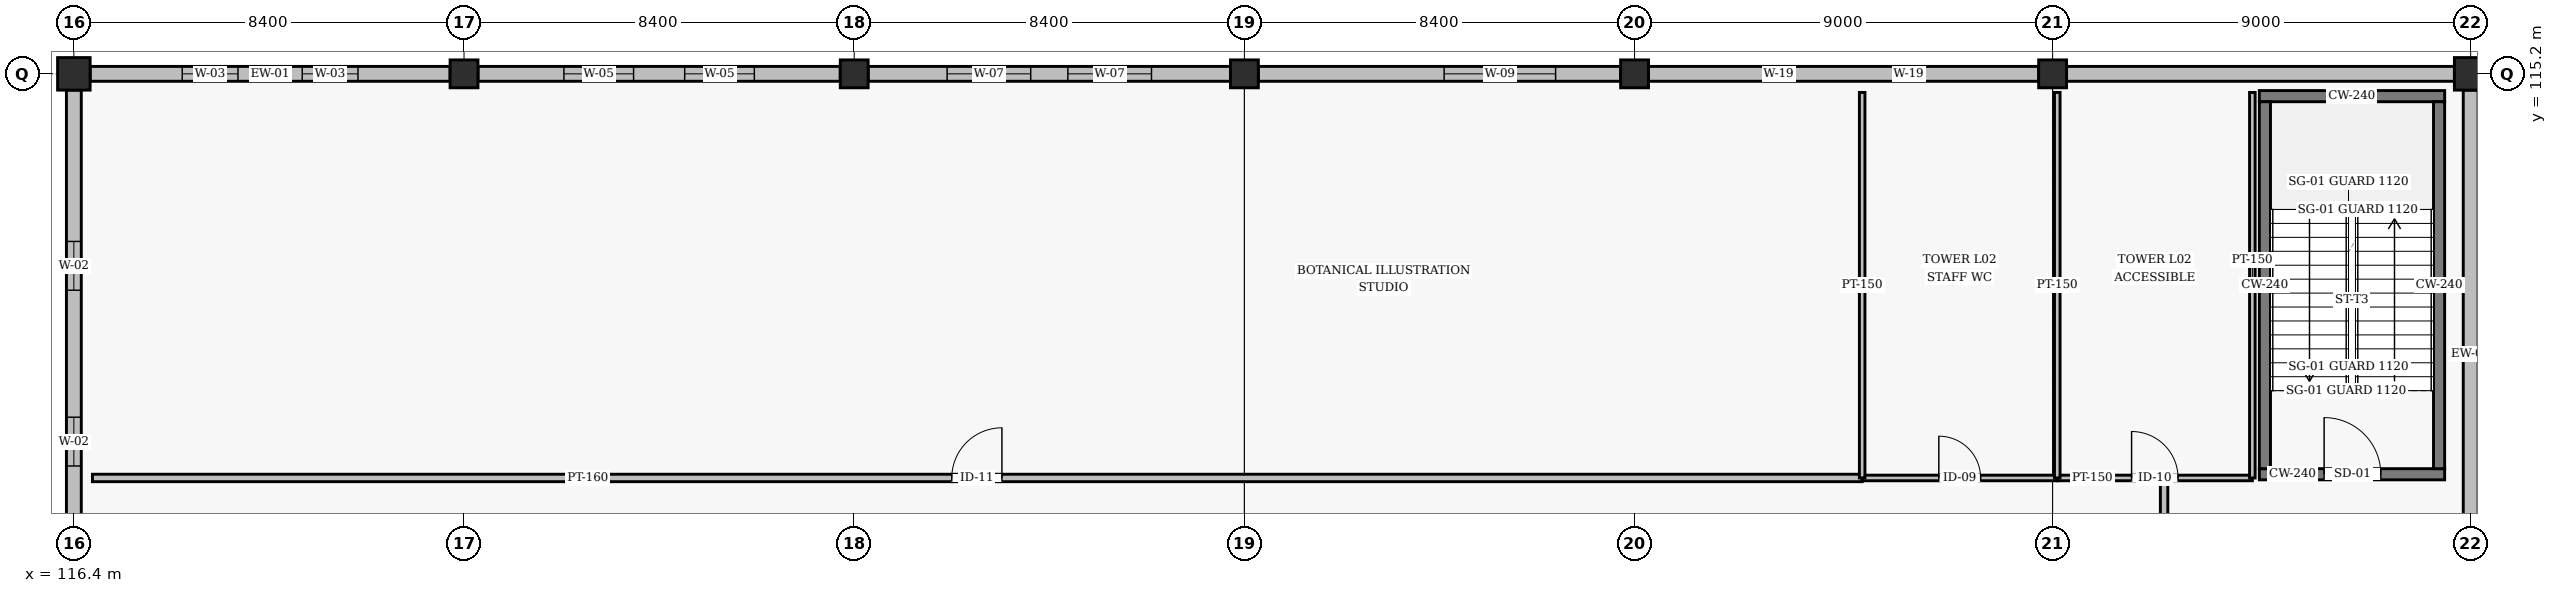
"""IFC4 building model, lengths in metres.
Left out: names, types, materials, properties, quantities, classifications, styles, units other than length and angle.
Written with IfcOpenShell. Run it as: python <this file> out.ifc"""

import sys

from ifc_helpers import new_model, si_unit, direction, frame, frame_2d, origin, origin_2d, place, context, subcontext, project, spatial, rectangle, hollow_rectangle, extrude, element, fill, save


model = new_model("IFC4")
c1 = context("Model", 3, precision=1e-05, world=origin(), true_north=direction((0.0, 1.0)))
c2 = subcontext(c1, "Body", "Model", "MODEL_VIEW")
j1 = project(units=[si_unit("LENGTHUNIT", "METRE"), si_unit("PLANEANGLEUNIT", "RADIAN")], contexts=[c1])
p1 = place(None, origin())
s1 = spatial("IfcSite", under=j1, at=p1, CompositionType="ELEMENT")
p2 = place(p1, origin())
s2 = spatial("IfcBuilding", under=s1, at=p2, CompositionType="ELEMENT")
p3 = place(p2, frame((0.0, 0.0, 9.0)))
s3 = spatial("IfcBuildingStorey", under=s2, at=p3, CompositionType="ELEMENT", Elevation=9.0)
p4 = place(p3, frame((116.4, 115.2, 0.0), z_axis=(0.0, 0.0, 1.0), x_axis=(1.0, 0.0, 0.0)))
e1 = element("IfcColumn", 1, at=p4, inside=s3, PredefinedType="COLUMN", context=c2, shape_type="SweptSolid", body=[
    extrude(hollow_rectangle(XDim=0.7, YDim=0.7, WallThickness=0.032, InnerFilletRadius=0.032, OuterFilletRadius=0.064, at=origin_2d()), origin(), (0.0, 0.0, 1.0), 4.2),
])
for number, where, z_axis, x_axis in (
    (2, (124.8, 115.2, 0.0), (0.0, 0.0, 1.0), (1.0, 0.0, 0.0)),
    (3, (133.2, 115.2, 0.0), (0.0, 0.0, 1.0), (1.0, 0.0, 0.0)),
    (4, (141.6, 115.2, 0.0), (0.0, 0.0, 1.0), (1.0, 0.0, 0.0)),
    (5, (150.0, 115.2, 0.0), (0.0, 0.0, 1.0), (1.0, 0.0, 0.0)),
    (6, (159.0, 115.2, 0.0), (0.0, 0.0, 1.0), (1.0, 0.0, 0.0)),
):
    element("IfcColumn", number, at=place(p3, frame(where, z_axis=z_axis, x_axis=x_axis)), inside=s3, PredefinedType="COLUMN", context=c2, shape_type="SweptSolid", body=[
        extrude(hollow_rectangle(XDim=0.6, YDim=0.6, WallThickness=0.025, InnerFilletRadius=0.025, OuterFilletRadius=0.05, at=origin_2d()), origin(), (0.0, 0.0, 1.0), 4.2),
    ])
p5 = place(p3, frame((168.0, 115.2, 0.0), z_axis=(0.0, 0.0, 1.0), x_axis=(1.0, 0.0, 0.0)))
e7 = element("IfcColumn", 7, at=p5, inside=s3, PredefinedType="COLUMN", context=c2, shape_type="SweptSolid", body=[
    extrude(hollow_rectangle(XDim=0.7, YDim=0.7, WallThickness=0.032, InnerFilletRadius=0.032, OuterFilletRadius=0.064, at=origin_2d()), origin(), (0.0, 0.0, 1.0), 4.2),
])
p6 = place(p3, frame((168.0, 103.5, 0.0), z_axis=(0.0, 0.0, 1.0), x_axis=(0.0, 1.0, 0.0)))
e8 = element("IfcWall", 8, at=p6, inside=s3, PredefinedType="SOLIDWALL", context=c2, shape_type="SweptSolid", body=[
    extrude(rectangle(XDim=11.35, YDim=0.32, at=frame_2d((5.675, 0.0))), origin(), (0.0, 0.0, 1.0), 3.143),
])
p7 = place(p3, frame((167.65, 115.2, 0.0), z_axis=(0.0, 0.0, 1.0), x_axis=(-1.0, 0.0, 0.0)))
e9 = element("IfcWall", 9, at=p7, inside=s3, PredefinedType="SOLIDWALL", context=c2, shape_type="SweptSolid", body=[
    extrude(rectangle(XDim=8.35, YDim=0.32, at=frame_2d((4.175, 0.0))), origin(), (0.0, 0.0, 1.0), 3.143),
])
p8 = place(p3, frame((158.7, 115.2, 0.0), z_axis=(0.0, 0.0, 1.0), x_axis=(-1.0, 0.0, 0.0)))
e10 = element("IfcWall", 10, at=p8, inside=s3, PredefinedType="SOLIDWALL", context=c2, shape_type="SweptSolid", body=[
    extrude(rectangle(XDim=8.4, YDim=0.32, at=frame_2d((4.2, 0.0))), origin(), (0.0, 0.0, 1.0), 3.143),
])
p9 = place(p8, frame((2.475, 0.0, 1.35)))
e11 = element("IfcOpeningElement", 11, at=p9, cuts=e10, PredefinedType="OPENING", context=c2, shape_type="SweptSolid", body=[
    extrude(rectangle(XDim=0.65, YDim=1.2, at=frame_2d((0.325, 0.6))), frame((0.0, 0.17, 0.0), z_axis=(0.0, -1.0, 0.0), x_axis=(1.0, 0.0, 0.0)), (0.0, 0.0, 1.0), 0.34),
])
p10 = place(p8, frame((5.275, 0.0, 1.35)))
e12 = element("IfcOpeningElement", 12, at=p10, cuts=e10, PredefinedType="OPENING", context=c2, shape_type="SweptSolid", body=[
    extrude(rectangle(XDim=0.65, YDim=1.2, at=frame_2d((0.325, 0.6))), frame((0.0, 0.17, 0.0), z_axis=(0.0, -1.0, 0.0), x_axis=(1.0, 0.0, 0.0)), (0.0, 0.0, 1.0), 0.34),
])
p11 = place(p3, frame((149.7, 115.2, 0.0), z_axis=(0.0, 0.0, 1.0), x_axis=(-1.0, 0.0, 0.0)))
e13 = element("IfcWall", 13, at=p11, inside=s3, PredefinedType="SOLIDWALL", context=c2, shape_type="SweptSolid", body=[
    extrude(rectangle(XDim=7.8, YDim=0.32, at=frame_2d((3.9, 0.0))), origin(), (0.0, 0.0, 1.0), 3.243),
])
p12 = place(p11, frame((1.4, 0.0, 0.85)))
e14 = element("IfcOpeningElement", 14, at=p12, cuts=e13, PredefinedType="OPENING", context=c2, shape_type="SweptSolid", body=[
    extrude(rectangle(XDim=2.4, YDim=2.1, at=frame_2d((1.2, 1.05))), frame((0.0, 0.17, 0.0), z_axis=(0.0, -1.0, 0.0), x_axis=(1.0, 0.0, 0.0)), (0.0, 0.0, 1.0), 0.34),
])
p13 = place(p3, frame((141.3, 115.2, 0.0), z_axis=(0.0, 0.0, 1.0), x_axis=(-1.0, 0.0, 0.0)))
e15 = element("IfcWall", 15, at=p13, inside=s3, PredefinedType="SOLIDWALL", context=c2, shape_type="SweptSolid", body=[
    extrude(rectangle(XDim=7.8, YDim=0.32, at=frame_2d((3.9, 0.0))), origin(), (0.0, 0.0, 1.0), 3.243),
])
p14 = place(p13, frame((1.7, 0.0, 0.85)))
e16 = element("IfcOpeningElement", 16, at=p14, cuts=e15, PredefinedType="OPENING", context=c2, shape_type="SweptSolid", body=[
    extrude(rectangle(XDim=1.8, YDim=2.1, at=frame_2d((0.9, 1.05))), frame((0.0, 0.17, 0.0), z_axis=(0.0, -1.0, 0.0), x_axis=(1.0, 0.0, 0.0)), (0.0, 0.0, 1.0), 0.34),
])
p15 = place(p13, frame((4.3, 0.0, 0.85)))
e17 = element("IfcOpeningElement", 17, at=p15, cuts=e15, PredefinedType="OPENING", context=c2, shape_type="SweptSolid", body=[
    extrude(rectangle(XDim=1.8, YDim=2.1, at=frame_2d((0.9, 1.05))), frame((0.0, 0.17, 0.0), z_axis=(0.0, -1.0, 0.0), x_axis=(1.0, 0.0, 0.0)), (0.0, 0.0, 1.0), 0.34),
])
p16 = place(p3, frame((132.9, 115.2, 0.0), z_axis=(0.0, 0.0, 1.0), x_axis=(-1.0, 0.0, 0.0)))
e18 = element("IfcWall", 18, at=p16, inside=s3, PredefinedType="SOLIDWALL", context=c2, shape_type="SweptSolid", body=[
    extrude(rectangle(XDim=7.8, YDim=0.32, at=frame_2d((3.9, 0.0))), origin(), (0.0, 0.0, 1.0), 3.243),
])
p17 = place(p16, frame((1.85, 0.0, 0.85)))
e19 = element("IfcOpeningElement", 19, at=p17, cuts=e18, PredefinedType="OPENING", context=c2, shape_type="SweptSolid", body=[
    extrude(rectangle(XDim=1.5, YDim=2.1, at=frame_2d((0.75, 1.05))), frame((0.0, 0.17, 0.0), z_axis=(0.0, -1.0, 0.0), x_axis=(1.0, 0.0, 0.0)), (0.0, 0.0, 1.0), 0.34),
])
p18 = place(p16, frame((4.45, 0.0, 0.85)))
e20 = element("IfcOpeningElement", 20, at=p18, cuts=e18, PredefinedType="OPENING", context=c2, shape_type="SweptSolid", body=[
    extrude(rectangle(XDim=1.5, YDim=2.1, at=frame_2d((0.75, 1.05))), frame((0.0, 0.17, 0.0), z_axis=(0.0, -1.0, 0.0), x_axis=(1.0, 0.0, 0.0)), (0.0, 0.0, 1.0), 0.34),
])
p19 = place(p3, frame((124.5, 115.2, 0.0), z_axis=(0.0, 0.0, 1.0), x_axis=(-1.0, 0.0, 0.0)))
e21 = element("IfcWall", 21, at=p19, inside=s3, PredefinedType="SOLIDWALL", context=c2, shape_type="SweptSolid", body=[
    extrude(rectangle(XDim=7.75, YDim=0.32, at=frame_2d((3.875, 0.0))), origin(), (0.0, 0.0, 1.0), 3.243),
])
p20 = place(p19, frame((1.983, 0.0, 0.85)))
e22 = element("IfcOpeningElement", 22, at=p20, cuts=e21, PredefinedType="OPENING", context=c2, shape_type="SweptSolid", body=[
    extrude(rectangle(XDim=1.2, YDim=2.1, at=frame_2d((0.6, 1.05))), frame((0.0, 0.17, 0.0), z_axis=(0.0, -1.0, 0.0), x_axis=(1.0, 0.0, 0.0)), (0.0, 0.0, 1.0), 0.34),
])
p21 = place(p19, frame((4.567, 0.0, 0.85)))
e23 = element("IfcOpeningElement", 23, at=p21, cuts=e21, PredefinedType="OPENING", context=c2, shape_type="SweptSolid", body=[
    extrude(rectangle(XDim=1.2, YDim=2.1, at=frame_2d((0.6, 1.05))), frame((0.0, 0.17, 0.0), z_axis=(0.0, -1.0, 0.0), x_axis=(1.0, 0.0, 0.0)), (0.0, 0.0, 1.0), 0.34),
])
p22 = place(p3, frame((116.4, 114.85, 0.0), z_axis=(0.0, 0.0, 1.0), x_axis=(0.0, -1.0, 0.0)))
e24 = element("IfcWall", 24, at=p22, inside=s3, PredefinedType="SOLIDWALL", context=c2, shape_type="SweptSolid", body=[
    extrude(rectangle(XDim=11.35, YDim=0.32, at=frame_2d((5.675, 0.0))), origin(), (0.0, 0.0, 1.0), 3.143),
])
p23 = place(p22, frame((3.258, 0.0, 0.9)))
e25 = element("IfcOpeningElement", 25, at=p23, cuts=e24, PredefinedType="OPENING", context=c2, shape_type="SweptSolid", body=[
    extrude(rectangle(XDim=1.05, YDim=1.95, at=frame_2d((0.525, 0.975))), frame((0.0, 0.17, 0.0), z_axis=(0.0, -1.0, 0.0), x_axis=(1.0, 0.0, 0.0)), (0.0, 0.0, 1.0), 0.34),
])
p24 = place(p22, frame((7.042, 0.0, 0.9)))
e26 = element("IfcOpeningElement", 26, at=p24, cuts=e24, PredefinedType="OPENING", context=c2, shape_type="SweptSolid", body=[
    extrude(rectangle(XDim=1.05, YDim=1.95, at=frame_2d((0.525, 0.975))), frame((0.0, 0.17, 0.0), z_axis=(0.0, -1.0, 0.0), x_axis=(1.0, 0.0, 0.0)), (0.0, 0.0, 1.0), 0.34),
])
p25 = place(p3, frame((163.45, 106.58, 0.0), z_axis=(0.0, 0.0, 1.0), x_axis=(1.0, 0.0, 0.0)))
e27 = element("IfcWall", 27, at=p25, inside=s3, PredefinedType="SHEAR", context=c2, shape_type="SweptSolid", body=[
    extrude(rectangle(XDim=3.99, YDim=0.24, at=frame_2d((1.995, 0.0))), origin(), (0.0, 0.0, 1.0), 3.935),
])
p26 = place(p25, frame((1.395, 0.0, 0.0)))
e28 = element("IfcOpeningElement", 28, at=p26, cuts=e27, PredefinedType="OPENING", context=c2, shape_type="SweptSolid", body=[
    extrude(rectangle(XDim=1.22, YDim=2.18, at=frame_2d((0.61, 1.09))), frame((0.0, 0.13, 0.0), z_axis=(0.0, -1.0, 0.0), x_axis=(1.0, 0.0, 0.0)), (0.0, 0.0, 1.0), 0.26),
])
p27 = place(p3, frame((163.45, 114.72, 0.0), z_axis=(0.0, 0.0, 1.0), x_axis=(1.0, 0.0, 0.0)))
e29 = element("IfcWall", 29, at=p27, inside=s3, PredefinedType="SHEAR", context=c2, shape_type="SweptSolid", body=[
    extrude(rectangle(XDim=3.99, YDim=0.24, at=frame_2d((1.995, 0.0))), origin(), (0.0, 0.0, 1.0), 3.935),
])
for number, where, z_axis, x_axis in (
    (30, (163.57, 106.7, 0.0), (0.0, 0.0, 1.0), (0.0, 1.0, 0.0)),
    (31, (167.32, 106.7, 0.0), (0.0, 0.0, 1.0), (0.0, 1.0, 0.0)),
):
    element("IfcWall", number, at=place(p3, frame(where, z_axis=z_axis, x_axis=x_axis)), inside=s3, PredefinedType="SHEAR", context=c2, shape_type="SweptSolid", body=[
        extrude(rectangle(XDim=7.9, YDim=0.24, at=frame_2d((3.95, 0.0))), origin(), (0.0, 0.0, 1.0), 3.935),
    ])
p28 = place(p3, frame((161.4, 91.3, 0.0), z_axis=(0.0, 0.0, 1.0), x_axis=(0.0, 1.0, 0.0)))
e32 = element("IfcWall", 32, at=p28, inside=s3, PredefinedType="PARTITIONING", context=c2, shape_type="SweptSolid", body=[
    extrude(rectangle(XDim=15.1, YDim=0.16, at=frame_2d((7.55, 0.0))), origin(), (0.0, 0.0, 1.0), 3.285),
])
p29 = place(p28, frame((7.0, 0.0, 0.0)))
e33 = element("IfcOpeningElement", 33, at=p29, cuts=e32, PredefinedType="OPENING", context=c2, shape_type="SweptSolid", body=[
    extrude(rectangle(XDim=1.08, YDim=2.08, at=frame_2d((0.54, 1.04))), frame((0.0, 0.09, 0.0), z_axis=(0.0, -1.0, 0.0), x_axis=(1.0, 0.0, 0.0)), (0.0, 0.0, 1.0), 0.18),
])
p30 = place(p3, frame((116.8, 106.5, 0.0), z_axis=(0.0, 0.0, 1.0), x_axis=(1.0, 0.0, 0.0)))
e34 = element("IfcWall", 34, at=p30, inside=s3, PredefinedType="PARTITIONING", context=c2, shape_type="SweptSolid", body=[
    extrude(rectangle(XDim=38.1, YDim=0.16, at=frame_2d((19.05, 0.0))), origin(), (0.0, 0.0, 1.0), 3.185),
])
p31 = place(p30, frame((18.5, 0.0, 0.0)))
e35 = element("IfcOpeningElement", 35, at=p31, cuts=e34, PredefinedType="OPENING", context=c2, shape_type="SweptSolid", body=[
    extrude(rectangle(XDim=1.08, YDim=2.08, at=frame_2d((0.54, 1.04))), frame((0.0, 0.09, 0.0), z_axis=(0.0, -1.0, 0.0), x_axis=(1.0, 0.0, 0.0)), (0.0, 0.0, 1.0), 0.18),
])
p32 = place(p3, frame((154.9, 106.5, 0.0), z_axis=(0.0, 0.0, 1.0), x_axis=(1.0, 0.0, 0.0)))
e36 = element("IfcWall", 36, at=p32, inside=s3, PredefinedType="PARTITIONING", context=c2, shape_type="SweptSolid", body=[
    extrude(rectangle(XDim=4.2, YDim=0.12, at=frame_2d((2.1, 0.0))), origin(), (0.0, 0.0, 1.0), 3.185),
])
p33 = place(p32, frame((1.65, 0.0, 0.0)))
e37 = element("IfcOpeningElement", 37, at=p33, cuts=e36, PredefinedType="OPENING", context=c2, shape_type="SweptSolid", body=[
    extrude(rectangle(XDim=0.9, YDim=2.1, at=frame_2d((0.45, 1.05))), frame((0.0, 0.07, 0.0), z_axis=(0.0, -1.0, 0.0), x_axis=(1.0, 0.0, 0.0)), (0.0, 0.0, 1.0), 0.14),
])
p34 = place(p3, frame((159.1, 106.5, 0.0), z_axis=(0.0, 0.0, 1.0), x_axis=(1.0, 0.0, 0.0)))
e38 = element("IfcWall", 38, at=p34, inside=s3, PredefinedType="PARTITIONING", context=c2, shape_type="SweptSolid", body=[
    extrude(rectangle(XDim=4.2, YDim=0.12, at=frame_2d((2.1, 0.0))), origin(), (0.0, 0.0, 1.0), 3.935),
])
p35 = place(p34, frame((1.6, 0.0, 0.0)))
e39 = element("IfcOpeningElement", 39, at=p35, cuts=e38, PredefinedType="OPENING", context=c2, shape_type="SweptSolid", body=[
    extrude(rectangle(XDim=1.0, YDim=2.1, at=frame_2d((0.5, 1.05))), frame((0.0, 0.07, 0.0), z_axis=(0.0, -1.0, 0.0), x_axis=(1.0, 0.0, 0.0)), (0.0, 0.0, 1.0), 0.14),
])
p36 = place(p3, frame((154.9, 106.5, 0.0), z_axis=(0.0, 0.0, 1.0), x_axis=(0.0, 1.0, 0.0)))
e40 = element("IfcWall", 40, at=p36, inside=s3, PredefinedType="PARTITIONING", context=c2, shape_type="SweptSolid", body=[
    extrude(rectangle(XDim=8.3, YDim=0.12, at=frame_2d((4.15, 0.0))), origin(), (0.0, 0.0, 1.0), 3.535),
])
p37 = place(p3, frame((159.1, 106.5, 0.0), z_axis=(0.0, 0.0, 1.0), x_axis=(0.0, 1.0, 0.0)))
e41 = element("IfcWall", 41, at=p37, inside=s3, PredefinedType="PARTITIONING", context=c2, shape_type="SweptSolid", body=[
    extrude(rectangle(XDim=8.3, YDim=0.12, at=frame_2d((4.15, 0.0))), origin(), (0.0, 0.0, 1.0), 3.185),
])
p38 = place(p3, frame((163.3, 106.5, 0.0), z_axis=(0.0, 0.0, 1.0), x_axis=(0.0, 1.0, 0.0)))
e42 = element("IfcWall", 42, at=p38, inside=s3, PredefinedType="PARTITIONING", context=c2, shape_type="SweptSolid", body=[
    extrude(rectangle(XDim=8.3, YDim=0.12, at=frame_2d((4.15, 0.0))), origin(), (0.0, 0.0, 1.0), 3.935),
])
p39 = place(p9, origin())
e43 = element("IfcWindow", 43, at=p39, inside=s3, PartitioningType="SINGLE_PANEL", PredefinedType="WINDOW", context=c2, shape_type="SweptSolid", body=[
    extrude(rectangle(XDim=0.65, YDim=1.2, at=frame_2d((0.325, 0.6))), frame((0.0, 0.03, 0.0), z_axis=(0.0, -1.0, 0.0), x_axis=(1.0, 0.0, 0.0)), (0.0, 0.0, 1.0), 0.06),
])
fill(e11, e43)
p40 = place(p10, origin())
e44 = element("IfcWindow", 44, at=p40, inside=s3, PartitioningType="SINGLE_PANEL", PredefinedType="WINDOW", context=c2, shape_type="SweptSolid", body=[
    extrude(rectangle(XDim=0.65, YDim=1.2, at=frame_2d((0.325, 0.6))), frame((0.0, 0.03, 0.0), z_axis=(0.0, -1.0, 0.0), x_axis=(1.0, 0.0, 0.0)), (0.0, 0.0, 1.0), 0.06),
])
fill(e12, e44)
p41 = place(p12, origin())
e45 = element("IfcWindow", 45, at=p41, inside=s3, PartitioningType="SINGLE_PANEL", PredefinedType="WINDOW", context=c2, shape_type="SweptSolid", body=[
    extrude(rectangle(XDim=2.4, YDim=2.1, at=frame_2d((1.2, 1.05))), frame((0.0, 0.03, 0.0), z_axis=(0.0, -1.0, 0.0), x_axis=(1.0, 0.0, 0.0)), (0.0, 0.0, 1.0), 0.06),
])
fill(e14, e45)
p42 = place(p14, origin())
e46 = element("IfcWindow", 46, at=p42, inside=s3, PartitioningType="SINGLE_PANEL", PredefinedType="WINDOW", context=c2, shape_type="SweptSolid", body=[
    extrude(rectangle(XDim=1.8, YDim=2.1, at=frame_2d((0.9, 1.05))), frame((0.0, 0.03, 0.0), z_axis=(0.0, -1.0, 0.0), x_axis=(1.0, 0.0, 0.0)), (0.0, 0.0, 1.0), 0.06),
])
fill(e16, e46)
p43 = place(p15, origin())
e47 = element("IfcWindow", 47, at=p43, inside=s3, PartitioningType="SINGLE_PANEL", PredefinedType="WINDOW", context=c2, shape_type="SweptSolid", body=[
    extrude(rectangle(XDim=1.8, YDim=2.1, at=frame_2d((0.9, 1.05))), frame((0.0, 0.03, 0.0), z_axis=(0.0, -1.0, 0.0), x_axis=(1.0, 0.0, 0.0)), (0.0, 0.0, 1.0), 0.06),
])
fill(e17, e47)
p44 = place(p17, origin())
e48 = element("IfcWindow", 48, at=p44, inside=s3, PartitioningType="SINGLE_PANEL", PredefinedType="WINDOW", context=c2, shape_type="SweptSolid", body=[
    extrude(rectangle(XDim=1.5, YDim=2.1, at=frame_2d((0.75, 1.05))), frame((0.0, 0.03, 0.0), z_axis=(0.0, -1.0, 0.0), x_axis=(1.0, 0.0, 0.0)), (0.0, 0.0, 1.0), 0.06),
])
fill(e19, e48)
p45 = place(p18, origin())
e49 = element("IfcWindow", 49, at=p45, inside=s3, PartitioningType="SINGLE_PANEL", PredefinedType="WINDOW", context=c2, shape_type="SweptSolid", body=[
    extrude(rectangle(XDim=1.5, YDim=2.1, at=frame_2d((0.75, 1.05))), frame((0.0, 0.03, 0.0), z_axis=(0.0, -1.0, 0.0), x_axis=(1.0, 0.0, 0.0)), (0.0, 0.0, 1.0), 0.06),
])
fill(e20, e49)
p46 = place(p20, origin())
e50 = element("IfcWindow", 50, at=p46, inside=s3, PartitioningType="SINGLE_PANEL", PredefinedType="WINDOW", context=c2, shape_type="SweptSolid", body=[
    extrude(rectangle(XDim=1.2, YDim=2.1, at=frame_2d((0.6, 1.05))), frame((0.0, 0.03, 0.0), z_axis=(0.0, -1.0, 0.0), x_axis=(1.0, 0.0, 0.0)), (0.0, 0.0, 1.0), 0.06),
])
fill(e22, e50)
p47 = place(p21, origin())
e51 = element("IfcWindow", 51, at=p47, inside=s3, PartitioningType="SINGLE_PANEL", PredefinedType="WINDOW", context=c2, shape_type="SweptSolid", body=[
    extrude(rectangle(XDim=1.2, YDim=2.1, at=frame_2d((0.6, 1.05))), frame((0.0, 0.03, 0.0), z_axis=(0.0, -1.0, 0.0), x_axis=(1.0, 0.0, 0.0)), (0.0, 0.0, 1.0), 0.06),
])
fill(e23, e51)
p48 = place(p23, origin())
e52 = element("IfcWindow", 52, at=p48, inside=s3, PartitioningType="SINGLE_PANEL", PredefinedType="WINDOW", context=c2, shape_type="SweptSolid", body=[
    extrude(rectangle(XDim=1.05, YDim=1.95, at=frame_2d((0.525, 0.975))), frame((0.0, 0.03, 0.0), z_axis=(0.0, -1.0, 0.0), x_axis=(1.0, 0.0, 0.0)), (0.0, 0.0, 1.0), 0.06),
])
fill(e25, e52)
p49 = place(p24, origin())
e53 = element("IfcWindow", 53, at=p49, inside=s3, PartitioningType="SINGLE_PANEL", PredefinedType="WINDOW", context=c2, shape_type="SweptSolid", body=[
    extrude(rectangle(XDim=1.05, YDim=1.95, at=frame_2d((0.525, 0.975))), frame((0.0, 0.03, 0.0), z_axis=(0.0, -1.0, 0.0), x_axis=(1.0, 0.0, 0.0)), (0.0, 0.0, 1.0), 0.06),
])
fill(e26, e53)
p50 = place(p26, origin())
e54 = element("IfcDoor", 54, at=p50, inside=s3, OperationType="SINGLE_SWING_LEFT", PredefinedType="DOOR", context=c2, shape_type="SweptSolid", body=[
    extrude(rectangle(XDim=1.22, YDim=2.18, at=frame_2d((0.61, 1.09))), frame((0.0, 0.025, 0.0), z_axis=(0.0, -1.0, 0.0), x_axis=(1.0, 0.0, 0.0)), (0.0, 0.0, 1.0), 0.05),
])
fill(e28, e54)
p51 = place(p31, origin())
e55 = element("IfcDoor", 55, at=p51, inside=s3, OperationType="SINGLE_SWING_RIGHT", PredefinedType="DOOR", context=c2, shape_type="SweptSolid", body=[
    extrude(rectangle(XDim=1.08, YDim=2.08, at=frame_2d((0.54, 1.04))), frame((0.0, 0.025, 0.0), z_axis=(0.0, -1.0, 0.0), x_axis=(1.0, 0.0, 0.0)), (0.0, 0.0, 1.0), 0.05),
])
fill(e35, e55)
p52 = place(p33, origin())
e56 = element("IfcDoor", 56, at=p52, inside=s3, OperationType="SINGLE_SWING_LEFT", PredefinedType="DOOR", context=c2, shape_type="SweptSolid", body=[
    extrude(rectangle(XDim=0.9, YDim=2.1, at=frame_2d((0.45, 1.05))), frame((0.0, 0.025, 0.0), z_axis=(0.0, -1.0, 0.0), x_axis=(1.0, 0.0, 0.0)), (0.0, 0.0, 1.0), 0.05),
])
fill(e37, e56)
p53 = place(p35, origin())
e57 = element("IfcDoor", 57, at=p53, inside=s3, OperationType="SINGLE_SWING_LEFT", PredefinedType="DOOR", context=c2, shape_type="SweptSolid", body=[
    extrude(rectangle(XDim=1.0, YDim=2.1, at=frame_2d((0.5, 1.05))), frame((0.0, 0.025, 0.0), z_axis=(0.0, -1.0, 0.0), x_axis=(1.0, 0.0, 0.0)), (0.0, 0.0, 1.0), 0.05),
])
fill(e39, e57)
save(model, sys.argv[1])
